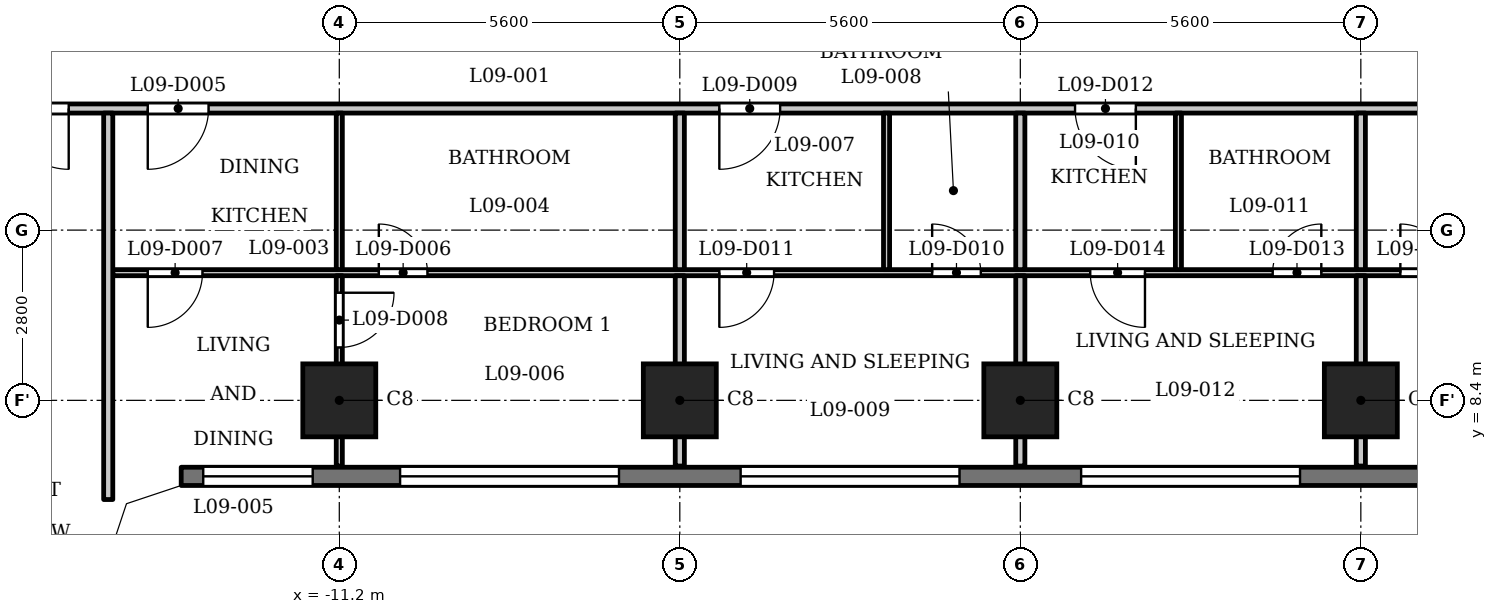
"""IFC4 building model, lengths in metres.
Left out: names, types, materials, properties, quantities, classifications, styles, units other than length and angle.
Written with IfcOpenShell. Run it as: python <this file> out.ifc"""

import sys

from ifc_helpers import new_model, si_unit, direction, frame, frame_2d, origin, origin_2d, place, context, subcontext, project, spatial, polyline, rectangle, outline, extrude, element, fill, save


model = new_model("IFC4")
c1 = context("Model", 3, precision=1e-05, world=origin(), true_north=direction((0.0, 1.0)))
c2 = subcontext(c1, "Body", "Model", "MODEL_VIEW")
j1 = project(units=[si_unit("LENGTHUNIT", "METRE"), si_unit("PLANEANGLEUNIT", "RADIAN")], contexts=[c1])
p1 = place(None, origin())
s1 = spatial("IfcSite", under=j1, at=p1, CompositionType="ELEMENT")
p2 = place(p1, origin())
s2 = spatial("IfcBuilding", under=s1, at=p2, CompositionType="ELEMENT")
p3 = place(p2, frame((0.0, 0.0, 41.0)))
s3 = spatial("IfcBuildingStorey", under=s2, at=p3, CompositionType="ELEMENT", Elevation=41.0)
for number, where, z_axis, x_axis in (
    (1, (-11.2, 8.4, 0.0), (0.0, 0.0, 1.0), (1.0, 0.0, 0.0)),
    (2, (-5.6, 8.4, 0.0), (0.0, 0.0, 1.0), (1.0, 0.0, 0.0)),
    (3, (0.0, 8.4, 0.0), (0.0, 0.0, 1.0), (1.0, 0.0, 0.0)),
    (4, (5.6, 8.4, 0.0), (0.0, 0.0, 1.0), (1.0, 0.0, 0.0)),
):
    element("IfcColumn", number, at=place(p3, frame(where, z_axis=z_axis, x_axis=x_axis)), inside=s3, PredefinedType="COLUMN", context=c2, shape_type="SweptSolid", body=[
        extrude(rectangle(XDim=1.2, YDim=1.2, at=origin_2d()), origin(), (0.0, 0.0, 1.0), 3.5),
    ])
p4 = place(p3, frame((-13.8, 7.15, 0.0), z_axis=(0.0, 0.0, 1.0), x_axis=(1.0, 0.0, 0.0)))
e5 = element("IfcWall", 5, at=p4, inside=s3, PredefinedType="SOLIDWALL", context=c2, shape_type="SweptSolid", body=[
    extrude(rectangle(XDim=27.6, YDim=0.3, at=frame_2d((13.8, 0.0))), origin(), (0.0, 0.0, 1.0), 3.2),
])
p5 = place(p4, frame((0.363, 0.0, 0.9)))
e6 = element("IfcOpeningElement", 6, at=p5, cuts=e5, PredefinedType="OPENING", context=c2, shape_type="SweptSolid", body=[
    extrude(rectangle(XDim=1.8, YDim=1.25, at=frame_2d((0.9, 0.625))), frame((0.0, 0.16, 0.0), z_axis=(0.0, -1.0, 0.0), x_axis=(1.0, 0.0, 0.0)), (0.0, 0.0, 1.0), 0.32),
])
p6 = place(p4, frame((3.6, 0.0, 1.2)))
e7 = element("IfcOpeningElement", 7, at=p6, cuts=e5, PredefinedType="OPENING", context=c2, shape_type="SweptSolid", body=[
    extrude(rectangle(XDim=3.6, YDim=0.95, at=frame_2d((1.8, 0.475))), frame((0.0, 0.16, 0.0), z_axis=(0.0, -1.0, 0.0), x_axis=(1.0, 0.0, 0.0)), (0.0, 0.0, 1.0), 0.32),
])
p7 = place(p4, frame((9.2, 0.0, 1.2)))
e8 = element("IfcOpeningElement", 8, at=p7, cuts=e5, PredefinedType="OPENING", context=c2, shape_type="SweptSolid", body=[
    extrude(rectangle(XDim=3.6, YDim=0.95, at=frame_2d((1.8, 0.475))), frame((0.0, 0.16, 0.0), z_axis=(0.0, -1.0, 0.0), x_axis=(1.0, 0.0, 0.0)), (0.0, 0.0, 1.0), 0.32),
])
p8 = place(p4, frame((14.8, 0.0, 1.2)))
e9 = element("IfcOpeningElement", 9, at=p8, cuts=e5, PredefinedType="OPENING", context=c2, shape_type="SweptSolid", body=[
    extrude(rectangle(XDim=3.6, YDim=0.95, at=frame_2d((1.8, 0.475))), frame((0.0, 0.16, 0.0), z_axis=(0.0, -1.0, 0.0), x_axis=(1.0, 0.0, 0.0)), (0.0, 0.0, 1.0), 0.32),
])
p9 = place(p4, frame((20.4, 0.0, 1.2)))
e10 = element("IfcOpeningElement", 10, at=p9, cuts=e5, PredefinedType="OPENING", context=c2, shape_type="SweptSolid", body=[
    extrude(rectangle(XDim=3.6, YDim=0.95, at=frame_2d((1.8, 0.475))), frame((0.0, 0.16, 0.0), z_axis=(0.0, -1.0, 0.0), x_axis=(1.0, 0.0, 0.0)), (0.0, 0.0, 1.0), 0.32),
])
p10 = place(p4, frame((25.438, 0.0, 0.9)))
e11 = element("IfcOpeningElement", 11, at=p10, cuts=e5, PredefinedType="OPENING", context=c2, shape_type="SweptSolid", body=[
    extrude(rectangle(XDim=1.8, YDim=1.25, at=frame_2d((0.9, 0.625))), frame((0.0, 0.16, 0.0), z_axis=(0.0, -1.0, 0.0), x_axis=(1.0, 0.0, 0.0)), (0.0, 0.0, 1.0), 0.32),
])
p11 = place(p3, frame((-14.925, 10.5, 0.0), z_axis=(0.0, 0.0, 1.0), x_axis=(1.0, 0.0, 0.0)))
e12 = element("IfcWall", 12, at=p11, inside=s3, PredefinedType="PARTITIONING", context=c2, shape_type="SweptSolid", body=[
    extrude(rectangle(XDim=29.85, YDim=0.1, at=frame_2d((14.925, 0.0))), origin(), (0.0, 0.0, 1.0), 3.2),
])
p12 = place(p11, frame((4.375, 0.0, 0.0)))
e13 = element("IfcOpeningElement", 13, at=p12, cuts=e12, PredefinedType="OPENING", context=c2, shape_type="SweptSolid", body=[
    extrude(rectangle(XDim=0.8, YDim=2.1, at=frame_2d((0.4, 1.05))), frame((0.0, 0.06, 0.0), z_axis=(0.0, -1.0, 0.0), x_axis=(1.0, 0.0, 0.0)), (0.0, 0.0, 1.0), 0.12),
])
p13 = place(p11, frame((0.575, 0.0, 0.0)))
e14 = element("IfcOpeningElement", 14, at=p13, cuts=e12, PredefinedType="OPENING", context=c2, shape_type="SweptSolid", body=[
    extrude(rectangle(XDim=0.9, YDim=2.1, at=frame_2d((0.45, 1.05))), frame((0.0, 0.06, 0.0), z_axis=(0.0, -1.0, 0.0), x_axis=(1.0, 0.0, 0.0)), (0.0, 0.0, 1.0), 0.12),
])
p14 = place(p11, frame((13.475, 0.0, 0.0)))
e15 = element("IfcOpeningElement", 15, at=p14, cuts=e12, PredefinedType="OPENING", context=c2, shape_type="SweptSolid", body=[
    extrude(rectangle(XDim=0.8, YDim=2.1, at=frame_2d((0.4, 1.05))), frame((0.0, 0.06, 0.0), z_axis=(0.0, -1.0, 0.0), x_axis=(1.0, 0.0, 0.0)), (0.0, 0.0, 1.0), 0.12),
])
p15 = place(p11, frame((9.975, 0.0, 0.0)))
e16 = element("IfcOpeningElement", 16, at=p15, cuts=e12, PredefinedType="OPENING", context=c2, shape_type="SweptSolid", body=[
    extrude(rectangle(XDim=0.9, YDim=2.1, at=frame_2d((0.45, 1.05))), frame((0.0, 0.06, 0.0), z_axis=(0.0, -1.0, 0.0), x_axis=(1.0, 0.0, 0.0)), (0.0, 0.0, 1.0), 0.12),
])
p16 = place(p11, frame((19.075, 0.0, 0.0)))
e17 = element("IfcOpeningElement", 17, at=p16, cuts=e12, PredefinedType="OPENING", context=c2, shape_type="SweptSolid", body=[
    extrude(rectangle(XDim=0.8, YDim=2.1, at=frame_2d((0.4, 1.05))), frame((0.0, 0.06, 0.0), z_axis=(0.0, -1.0, 0.0), x_axis=(1.0, 0.0, 0.0)), (0.0, 0.0, 1.0), 0.12),
])
p17 = place(p11, frame((16.075, 0.0, 0.0)))
e18 = element("IfcOpeningElement", 18, at=p17, cuts=e12, PredefinedType="OPENING", context=c2, shape_type="SweptSolid", body=[
    extrude(rectangle(XDim=0.9, YDim=2.1, at=frame_2d((0.45, 1.05))), frame((0.0, 0.06, 0.0), z_axis=(0.0, -1.0, 0.0), x_axis=(1.0, 0.0, 0.0)), (0.0, 0.0, 1.0), 0.12),
])
p18 = place(p11, frame((21.175, 0.0, 0.0)))
e19 = element("IfcOpeningElement", 19, at=p18, cuts=e12, PredefinedType="OPENING", context=c2, shape_type="SweptSolid", body=[
    extrude(rectangle(XDim=0.8, YDim=2.1, at=frame_2d((0.4, 1.05))), frame((0.0, 0.06, 0.0), z_axis=(0.0, -1.0, 0.0), x_axis=(1.0, 0.0, 0.0)), (0.0, 0.0, 1.0), 0.12),
])
p19 = place(p11, frame((26.775, 0.0, 0.0)))
e20 = element("IfcOpeningElement", 20, at=p19, cuts=e12, PredefinedType="OPENING", context=c2, shape_type="SweptSolid", body=[
    extrude(rectangle(XDim=0.9, YDim=2.1, at=frame_2d((0.45, 1.05))), frame((0.0, 0.06, 0.0), z_axis=(0.0, -1.0, 0.0), x_axis=(1.0, 0.0, 0.0)), (0.0, 0.0, 1.0), 0.12),
])
p20 = place(p3, frame((-17.4, 13.2, 0.0), z_axis=(0.0, 0.0, 1.0), x_axis=(1.0, 0.0, 0.0)))
e21 = element("IfcWall", 21, at=p20, inside=s3, PredefinedType="PARTITIONING", context=c2, shape_type="SweptSolid", body=[
    extrude(rectangle(XDim=34.8, YDim=0.15, at=frame_2d((17.4, 0.0))), origin(), (0.0, 0.0, 1.0), 3.2),
])
p21 = place(p20, frame((0.75, 0.0, 0.0)))
e22 = element("IfcOpeningElement", 22, at=p21, cuts=e21, PredefinedType="OPENING", context=c2, shape_type="SweptSolid", body=[
    extrude(rectangle(XDim=1.0, YDim=2.1, at=frame_2d((0.5, 1.05))), frame((0.0, 0.085, 0.0), z_axis=(0.0, -1.0, 0.0), x_axis=(1.0, 0.0, 0.0)), (0.0, 0.0, 1.0), 0.17),
])
p22 = place(p20, frame((33.15, 0.0, 0.0)))
e23 = element("IfcOpeningElement", 23, at=p22, cuts=e21, PredefinedType="OPENING", context=c2, shape_type="SweptSolid", body=[
    extrude(rectangle(XDim=1.0, YDim=2.1, at=frame_2d((0.5, 1.05))), frame((0.0, 0.085, 0.0), z_axis=(0.0, -1.0, 0.0), x_axis=(1.0, 0.0, 0.0)), (0.0, 0.0, 1.0), 0.17),
])
p23 = place(p20, frame((3.05, 0.0, 0.0)))
e24 = element("IfcOpeningElement", 24, at=p23, cuts=e21, PredefinedType="OPENING", context=c2, shape_type="SweptSolid", body=[
    extrude(rectangle(XDim=1.0, YDim=2.1, at=frame_2d((0.5, 1.05))), frame((0.0, 0.085, 0.0), z_axis=(0.0, -1.0, 0.0), x_axis=(1.0, 0.0, 0.0)), (0.0, 0.0, 1.0), 0.17),
])
p24 = place(p20, frame((12.45, 0.0, 0.0)))
e25 = element("IfcOpeningElement", 25, at=p24, cuts=e21, PredefinedType="OPENING", context=c2, shape_type="SweptSolid", body=[
    extrude(rectangle(XDim=1.0, YDim=2.1, at=frame_2d((0.5, 1.05))), frame((0.0, 0.085, 0.0), z_axis=(0.0, -1.0, 0.0), x_axis=(1.0, 0.0, 0.0)), (0.0, 0.0, 1.0), 0.17),
])
p25 = place(p20, frame((18.3, 0.0, 0.0)))
e26 = element("IfcOpeningElement", 26, at=p25, cuts=e21, PredefinedType="OPENING", context=c2, shape_type="SweptSolid", body=[
    extrude(rectangle(XDim=1.0, YDim=2.1, at=frame_2d((0.5, 1.05))), frame((0.0, 0.085, 0.0), z_axis=(0.0, -1.0, 0.0), x_axis=(1.0, 0.0, 0.0)), (0.0, 0.0, 1.0), 0.17),
])
p26 = place(p20, frame((29.25, 0.0, 0.0)))
e27 = element("IfcOpeningElement", 27, at=p26, cuts=e21, PredefinedType="OPENING", context=c2, shape_type="SweptSolid", body=[
    extrude(rectangle(XDim=1.0, YDim=2.1, at=frame_2d((0.5, 1.05))), frame((0.0, 0.085, 0.0), z_axis=(0.0, -1.0, 0.0), x_axis=(1.0, 0.0, 0.0)), (0.0, 0.0, 1.0), 0.17),
])
p27 = place(p3, frame((-15.0, 6.769, 0.0), z_axis=(0.0, 0.0, 1.0), x_axis=(0.0, 1.0, 0.0)))
e28 = element("IfcWall", 28, at=p27, inside=s3, PredefinedType="PARTITIONING", context=c2, shape_type="SweptSolid", body=[
    extrude(rectangle(XDim=6.356, YDim=0.15, at=frame_2d((3.178, 0.0))), origin(), (0.0, 0.0, 1.0), 3.2),
])
p28 = place(p3, frame((-11.2, 7.32, 0.0), z_axis=(0.0, 0.0, 1.0), x_axis=(0.0, 1.0, 0.0)))
e29 = element("IfcWall", 29, at=p28, inside=s3, PredefinedType="PARTITIONING", context=c2, shape_type="SweptSolid", body=[
    extrude(rectangle(XDim=3.13, YDim=0.1, at=frame_2d((1.565, 0.0))), origin(), (0.0, 0.0, 1.0), 3.2),
])
p29 = place(p28, frame((1.95, 0.0, 0.0)))
e30 = element("IfcOpeningElement", 30, at=p29, cuts=e29, PredefinedType="OPENING", context=c2, shape_type="SweptSolid", body=[
    extrude(rectangle(XDim=0.9, YDim=2.1, at=frame_2d((0.45, 1.05))), frame((0.0, 0.06, 0.0), z_axis=(0.0, -1.0, 0.0), x_axis=(1.0, 0.0, 0.0)), (0.0, 0.0, 1.0), 0.12),
])
p30 = place(p3, frame((-11.2, 10.55, 0.0), z_axis=(0.0, 0.0, 1.0), x_axis=(0.0, 1.0, 0.0)))
e31 = element("IfcWall", 31, at=p30, inside=s3, PredefinedType="PARTITIONING", context=c2, shape_type="SweptSolid", body=[
    extrude(rectangle(XDim=2.575, YDim=0.1, at=frame_2d((1.288, 0.0))), origin(), (0.0, 0.0, 1.0), 3.2),
])
p31 = place(p3, frame((-5.6, 7.32, 0.0), z_axis=(0.0, 0.0, 1.0), x_axis=(0.0, 1.0, 0.0)))
e32 = element("IfcWall", 32, at=p31, inside=s3, PredefinedType="PARTITIONING", context=c2, shape_type="SweptSolid", body=[
    extrude(rectangle(XDim=3.13, YDim=0.15, at=frame_2d((1.565, 0.0))), origin(), (0.0, 0.0, 1.0), 3.2),
])
p32 = place(p3, frame((-5.6, 10.55, 0.0), z_axis=(0.0, 0.0, 1.0), x_axis=(0.0, 1.0, 0.0)))
e33 = element("IfcWall", 33, at=p32, inside=s3, PredefinedType="PARTITIONING", context=c2, shape_type="SweptSolid", body=[
    extrude(rectangle(XDim=2.575, YDim=0.15, at=frame_2d((1.288, 0.0))), origin(), (0.0, 0.0, 1.0), 3.2),
])
p33 = place(p3, frame((-2.2, 10.55, 0.0), z_axis=(0.0, 0.0, 1.0), x_axis=(0.0, 1.0, 0.0)))
e34 = element("IfcWall", 34, at=p33, inside=s3, PredefinedType="PARTITIONING", context=c2, shape_type="SweptSolid", body=[
    extrude(rectangle(XDim=2.575, YDim=0.1, at=frame_2d((1.288, 0.0))), origin(), (0.0, 0.0, 1.0), 3.2),
])
p34 = place(p3, frame((0.0, 7.32, 0.0), z_axis=(0.0, 0.0, 1.0), x_axis=(0.0, 1.0, 0.0)))
e35 = element("IfcWall", 35, at=p34, inside=s3, PredefinedType="PARTITIONING", context=c2, shape_type="SweptSolid", body=[
    extrude(rectangle(XDim=3.13, YDim=0.15, at=frame_2d((1.565, 0.0))), origin(), (0.0, 0.0, 1.0), 3.2),
])
p35 = place(p3, frame((0.0, 10.55, 0.0), z_axis=(0.0, 0.0, 1.0), x_axis=(0.0, 1.0, 0.0)))
e36 = element("IfcWall", 36, at=p35, inside=s3, PredefinedType="PARTITIONING", context=c2, shape_type="SweptSolid", body=[
    extrude(rectangle(XDim=2.575, YDim=0.15, at=frame_2d((1.288, 0.0))), origin(), (0.0, 0.0, 1.0), 3.2),
])
p36 = place(p3, frame((2.6, 10.55, 0.0), z_axis=(0.0, 0.0, 1.0), x_axis=(0.0, 1.0, 0.0)))
e37 = element("IfcWall", 37, at=p36, inside=s3, PredefinedType="PARTITIONING", context=c2, shape_type="SweptSolid", body=[
    extrude(rectangle(XDim=2.575, YDim=0.1, at=frame_2d((1.288, 0.0))), origin(), (0.0, 0.0, 1.0), 3.2),
])
p37 = place(p3, frame((5.6, 7.32, 0.0), z_axis=(0.0, 0.0, 1.0), x_axis=(0.0, 1.0, 0.0)))
e38 = element("IfcWall", 38, at=p37, inside=s3, PredefinedType="PARTITIONING", context=c2, shape_type="SweptSolid", body=[
    extrude(rectangle(XDim=3.13, YDim=0.15, at=frame_2d((1.565, 0.0))), origin(), (0.0, 0.0, 1.0), 3.2),
])
p38 = place(p3, frame((5.6, 10.55, 0.0), z_axis=(0.0, 0.0, 1.0), x_axis=(0.0, 1.0, 0.0)))
e39 = element("IfcWall", 39, at=p38, inside=s3, PredefinedType="PARTITIONING", context=c2, shape_type="SweptSolid", body=[
    extrude(rectangle(XDim=2.575, YDim=0.15, at=frame_2d((1.288, 0.0))), origin(), (0.0, 0.0, 1.0), 3.2),
])
p39 = place(p3, origin())
e40 = element("IfcWall", 40, at=p39, inside=s3, PredefinedType="SOLIDWALL", context=c2, shape_type="SweptSolid", body=[
    extrude(outline(polyline([(-13.849, 7.3), (-14.937, 6.937), (-15.3, 5.849), (-15.3, 5.8), (-15.0, 5.8), (-14.7, 6.7), (-13.8, 7.0), (-13.8, 7.3), (-13.849, 7.3)])), origin(), (0.0, 0.0, 1.0), 3.2),
])
p40 = place(p21, origin())
e41 = element("IfcDoor", 41, at=p40, inside=s3, OperationType="SINGLE_SWING_RIGHT", PredefinedType="DOOR", context=c2, shape_type="SweptSolid", body=[
    extrude(rectangle(XDim=1.0, YDim=2.1, at=frame_2d((0.5, 1.05))), frame((0.0, 0.025, 0.0), z_axis=(0.0, -1.0, 0.0), x_axis=(1.0, 0.0, 0.0)), (0.0, 0.0, 1.0), 0.05),
])
fill(e22, e41)
p41 = place(p23, origin())
e42 = element("IfcDoor", 42, at=p41, inside=s3, OperationType="SINGLE_SWING_LEFT", PredefinedType="DOOR", context=c2, shape_type="SweptSolid", body=[
    extrude(rectangle(XDim=1.0, YDim=2.1, at=frame_2d((0.5, 1.05))), frame((0.0, 0.025, 0.0), z_axis=(0.0, -1.0, 0.0), x_axis=(1.0, 0.0, 0.0)), (0.0, 0.0, 1.0), 0.05),
])
fill(e24, e42)
p42 = place(p12, origin())
e43 = element("IfcDoor", 43, at=p42, inside=s3, OperationType="SINGLE_SWING_RIGHT", PredefinedType="DOOR", context=c2, shape_type="SweptSolid", body=[
    extrude(rectangle(XDim=0.8, YDim=2.1, at=frame_2d((0.4, 1.05))), frame((0.0, 0.025, 0.0), z_axis=(0.0, -1.0, 0.0), x_axis=(1.0, 0.0, 0.0)), (0.0, 0.0, 1.0), 0.05),
])
fill(e13, e43)
p43 = place(p13, origin())
e44 = element("IfcDoor", 44, at=p43, inside=s3, OperationType="SINGLE_SWING_LEFT", PredefinedType="DOOR", context=c2, shape_type="SweptSolid", body=[
    extrude(rectangle(XDim=0.9, YDim=2.1, at=frame_2d((0.45, 1.05))), frame((0.0, 0.025, 0.0), z_axis=(0.0, -1.0, 0.0), x_axis=(1.0, 0.0, 0.0)), (0.0, 0.0, 1.0), 0.05),
])
fill(e14, e44)
p44 = place(p29, origin())
e45 = element("IfcDoor", 45, at=p44, inside=s3, OperationType="SINGLE_SWING_RIGHT", PredefinedType="DOOR", context=c2, shape_type="SweptSolid", body=[
    extrude(rectangle(XDim=0.9, YDim=2.1, at=frame_2d((0.45, 1.05))), frame((0.0, 0.025, 0.0), z_axis=(0.0, -1.0, 0.0), x_axis=(1.0, 0.0, 0.0)), (0.0, 0.0, 1.0), 0.05),
])
fill(e30, e45)
p45 = place(p24, origin())
e46 = element("IfcDoor", 46, at=p45, inside=s3, OperationType="SINGLE_SWING_LEFT", PredefinedType="DOOR", context=c2, shape_type="SweptSolid", body=[
    extrude(rectangle(XDim=1.0, YDim=2.1, at=frame_2d((0.5, 1.05))), frame((0.0, 0.025, 0.0), z_axis=(0.0, -1.0, 0.0), x_axis=(1.0, 0.0, 0.0)), (0.0, 0.0, 1.0), 0.05),
])
fill(e25, e46)
p46 = place(p14, origin())
e47 = element("IfcDoor", 47, at=p46, inside=s3, OperationType="SINGLE_SWING_RIGHT", PredefinedType="DOOR", context=c2, shape_type="SweptSolid", body=[
    extrude(rectangle(XDim=0.8, YDim=2.1, at=frame_2d((0.4, 1.05))), frame((0.0, 0.025, 0.0), z_axis=(0.0, -1.0, 0.0), x_axis=(1.0, 0.0, 0.0)), (0.0, 0.0, 1.0), 0.05),
])
fill(e15, e47)
p47 = place(p15, origin())
e48 = element("IfcDoor", 48, at=p47, inside=s3, OperationType="SINGLE_SWING_LEFT", PredefinedType="DOOR", context=c2, shape_type="SweptSolid", body=[
    extrude(rectangle(XDim=0.9, YDim=2.1, at=frame_2d((0.45, 1.05))), frame((0.0, 0.025, 0.0), z_axis=(0.0, -1.0, 0.0), x_axis=(1.0, 0.0, 0.0)), (0.0, 0.0, 1.0), 0.05),
])
fill(e16, e48)
p48 = place(p25, origin())
e49 = element("IfcDoor", 49, at=p48, inside=s3, OperationType="SINGLE_SWING_RIGHT", PredefinedType="DOOR", context=c2, shape_type="SweptSolid", body=[
    extrude(rectangle(XDim=1.0, YDim=2.1, at=frame_2d((0.5, 1.05))), frame((0.0, 0.025, 0.0), z_axis=(0.0, -1.0, 0.0), x_axis=(1.0, 0.0, 0.0)), (0.0, 0.0, 1.0), 0.05),
])
fill(e26, e49)
p49 = place(p16, origin())
e50 = element("IfcDoor", 50, at=p49, inside=s3, OperationType="SINGLE_SWING_LEFT", PredefinedType="DOOR", context=c2, shape_type="SweptSolid", body=[
    extrude(rectangle(XDim=0.8, YDim=2.1, at=frame_2d((0.4, 1.05))), frame((0.0, 0.025, 0.0), z_axis=(0.0, -1.0, 0.0), x_axis=(1.0, 0.0, 0.0)), (0.0, 0.0, 1.0), 0.05),
])
fill(e17, e50)
p50 = place(p17, origin())
e51 = element("IfcDoor", 51, at=p50, inside=s3, OperationType="SINGLE_SWING_RIGHT", PredefinedType="DOOR", context=c2, shape_type="SweptSolid", body=[
    extrude(rectangle(XDim=0.9, YDim=2.1, at=frame_2d((0.45, 1.05))), frame((0.0, 0.025, 0.0), z_axis=(0.0, -1.0, 0.0), x_axis=(1.0, 0.0, 0.0)), (0.0, 0.0, 1.0), 0.05),
])
fill(e18, e51)
p51 = place(p18, origin())
e52 = element("IfcDoor", 52, at=p51, inside=s3, OperationType="SINGLE_SWING_RIGHT", PredefinedType="DOOR", context=c2, shape_type="SweptSolid", body=[
    extrude(rectangle(XDim=0.8, YDim=2.1, at=frame_2d((0.4, 1.05))), frame((0.0, 0.025, 0.0), z_axis=(0.0, -1.0, 0.0), x_axis=(1.0, 0.0, 0.0)), (0.0, 0.0, 1.0), 0.05),
])
fill(e19, e52)
p52 = place(p5, origin())
e53 = element("IfcWindow", 53, at=p52, inside=s3, PartitioningType="SINGLE_PANEL", PredefinedType="WINDOW", context=c2, shape_type="SweptSolid", body=[
    extrude(rectangle(XDim=1.8, YDim=1.25, at=frame_2d((0.9, 0.625))), frame((0.0, 0.03, 0.0), z_axis=(0.0, -1.0, 0.0), x_axis=(1.0, 0.0, 0.0)), (0.0, 0.0, 1.0), 0.06),
])
fill(e6, e53)
p53 = place(p6, origin())
e54 = element("IfcWindow", 54, at=p53, inside=s3, PartitioningType="SINGLE_PANEL", PredefinedType="WINDOW", context=c2, shape_type="SweptSolid", body=[
    extrude(rectangle(XDim=3.6, YDim=0.95, at=frame_2d((1.8, 0.475))), frame((0.0, 0.03, 0.0), z_axis=(0.0, -1.0, 0.0), x_axis=(1.0, 0.0, 0.0)), (0.0, 0.0, 1.0), 0.06),
])
fill(e7, e54)
p54 = place(p7, origin())
e55 = element("IfcWindow", 55, at=p54, inside=s3, PartitioningType="SINGLE_PANEL", PredefinedType="WINDOW", context=c2, shape_type="SweptSolid", body=[
    extrude(rectangle(XDim=3.6, YDim=0.95, at=frame_2d((1.8, 0.475))), frame((0.0, 0.03, 0.0), z_axis=(0.0, -1.0, 0.0), x_axis=(1.0, 0.0, 0.0)), (0.0, 0.0, 1.0), 0.06),
])
fill(e8, e55)
p55 = place(p8, origin())
e56 = element("IfcWindow", 56, at=p55, inside=s3, PartitioningType="SINGLE_PANEL", PredefinedType="WINDOW", context=c2, shape_type="SweptSolid", body=[
    extrude(rectangle(XDim=3.6, YDim=0.95, at=frame_2d((1.8, 0.475))), frame((0.0, 0.03, 0.0), z_axis=(0.0, -1.0, 0.0), x_axis=(1.0, 0.0, 0.0)), (0.0, 0.0, 1.0), 0.06),
])
fill(e9, e56)
save(model, sys.argv[1])
